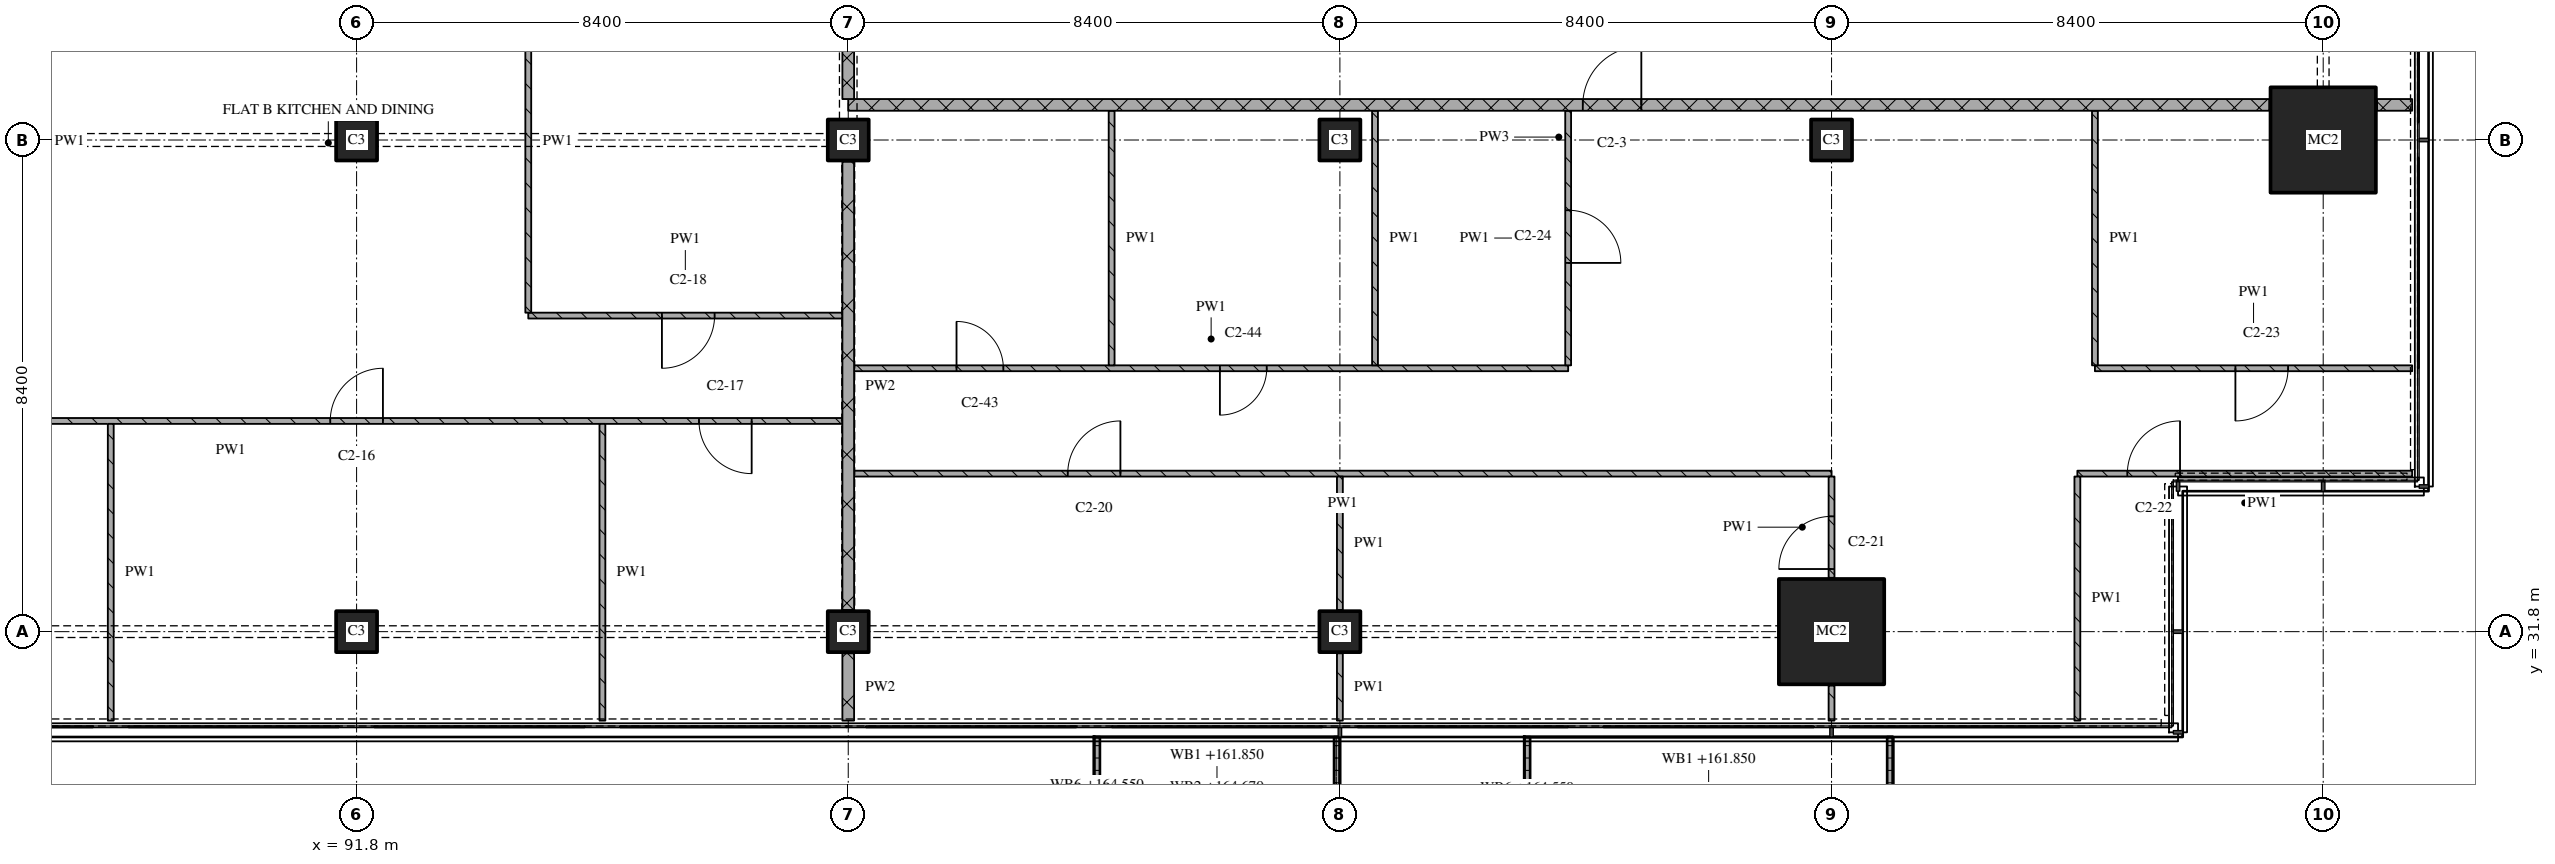
"""IFC4 building model, lengths in metres.
Left out: names, types, materials, properties, quantities, classifications, styles, units other than length and angle.
Written with IfcOpenShell. Run it as: python <this file> out.ifc"""

import sys

from ifc_helpers import new_model, si_unit, direction, frame, frame_2d, origin, origin_2d, place, context, subcontext, project, spatial, polyline, rectangle, outline, extrude, element, fill, save


model = new_model("IFC4")
c1 = context("Model", 3, precision=1e-05, world=origin(), true_north=direction((0.0, 1.0)))
c2 = subcontext(c1, "Body", "Model", "MODEL_VIEW")
j1 = project(units=[si_unit("LENGTHUNIT", "METRE"), si_unit("PLANEANGLEUNIT", "RADIAN")], contexts=[c1])
p1 = place(None, origin())
s1 = spatial("IfcSite", under=j1, at=p1, CompositionType="ELEMENT")
p2 = place(p1, origin())
s2 = spatial("IfcBuilding", under=s1, at=p2, CompositionType="ELEMENT")
p3 = place(p2, frame((0.0, 0.0, 161.85)))
s3 = spatial("IfcBuildingStorey", under=s2, at=p3, CompositionType="ELEMENT", Elevation=161.85)
for number, where, z_axis, x_axis in (
    (1, (91.8, 31.8, 0.0), (0.0, 0.0, 1.0), (1.0, 0.0, 0.0)),
    (2, (91.8, 40.2, 0.0), (0.0, 0.0, 1.0), (1.0, 0.0, 0.0)),
    (3, (100.2, 31.8, 0.0), (0.0, 0.0, 1.0), (1.0, 0.0, 0.0)),
    (4, (100.2, 40.2, 0.0), (0.0, 0.0, 1.0), (1.0, 0.0, 0.0)),
    (5, (108.6, 31.8, 0.0), (0.0, 0.0, 1.0), (1.0, 0.0, 0.0)),
    (6, (108.6, 40.2, 0.0), (0.0, 0.0, 1.0), (1.0, 0.0, 0.0)),
):
    element("IfcColumn", number, at=place(p3, frame(where, z_axis=z_axis, x_axis=x_axis)), inside=s3, PredefinedType="COLUMN", context=c2, shape_type="SweptSolid", body=[
        extrude(rectangle(XDim=0.7, YDim=0.7, at=origin_2d()), origin(), (0.0, 0.0, 1.0), 3.6),
    ])
p4 = place(p3, frame((117.0, 31.8, 0.0), z_axis=(0.0, 0.0, 1.0), x_axis=(1.0, 0.0, 0.0)))
e7 = element("IfcColumn", 7, at=p4, inside=s3, PredefinedType="COLUMN", context=c2, shape_type="SweptSolid", body=[
    extrude(rectangle(XDim=1.8, YDim=1.8, at=origin_2d()), origin(), (0.0, 0.0, 1.0), 3.6),
])
p5 = place(p3, frame((117.0, 40.2, 0.0), z_axis=(0.0, 0.0, 1.0), x_axis=(1.0, 0.0, 0.0)))
e8 = element("IfcColumn", 8, at=p5, inside=s3, PredefinedType="COLUMN", context=c2, shape_type="SweptSolid", body=[
    extrude(rectangle(XDim=0.7, YDim=0.7, at=origin_2d()), origin(), (0.0, 0.0, 1.0), 3.6),
])
p6 = place(p3, frame((125.4, 40.2, 0.0), z_axis=(0.0, 0.0, 1.0), x_axis=(1.0, 0.0, 0.0)))
e9 = element("IfcColumn", 9, at=p6, inside=s3, PredefinedType="COLUMN", context=c2, shape_type="SweptSolid", body=[
    extrude(rectangle(XDim=1.8, YDim=1.8, at=origin_2d()), origin(), (0.0, 0.0, 1.0), 3.6),
])
p7 = place(p3, origin())
e10 = element("IfcWall", 10, at=p7, inside=s3, PredefinedType="SOLIDWALL", context=c2, shape_type="SweptSolid", body=[
    extrude(outline(polyline([(104.4, 30.0), (104.5, 30.0), (104.5, 28.367), (108.5, 28.367), (108.5, 30.0), (108.6, 30.0), (108.6, 28.267), (104.4, 28.267), (104.4, 30.0)])), origin(), (0.0, 0.0, 1.0), 1.0),
])
p8 = place(p3, origin())
e11 = element("IfcWall", 11, at=p8, inside=s3, PredefinedType="SOLIDWALL", context=c2, shape_type="SweptSolid", body=[
    extrude(outline(polyline([(111.75, 30.0), (111.85, 30.0), (111.85, 28.233), (117.95, 28.233), (117.95, 30.0), (118.05, 30.0), (118.05, 28.133), (111.75, 28.133), (111.75, 30.0)])), origin(), (0.0, 0.0, 1.0), 1.0),
])
p9 = place(p3, frame((117.0, 34.5, 0.0), z_axis=(0.0, 0.0, 1.0), x_axis=(-1.0, 0.0, 0.0)))
e12 = element("IfcWall", 12, at=p9, inside=s3, PredefinedType="PARTITIONING", context=c2, shape_type="SweptSolid", body=[
    extrude(rectangle(XDim=16.7, YDim=0.1, at=frame_2d((8.35, 0.0))), origin(), (0.0, 0.0, 1.0), 3.32),
])
p10 = place(p9, frame((12.15, 0.0, 0.0)))
e13 = element("IfcOpeningElement", 13, at=p10, cuts=e12, PredefinedType="OPENING", context=c2, shape_type="SweptSolid", body=[
    extrude(rectangle(XDim=0.9, YDim=2.1, at=frame_2d((0.45, 1.05))), frame((0.0, 0.06, 0.0), z_axis=(0.0, -1.0, 0.0), x_axis=(1.0, 0.0, 0.0)), (0.0, 0.0, 1.0), 0.12),
])
p11 = place(p3, frame((126.92, 34.5, 0.0), z_axis=(0.0, 0.0, 1.0), x_axis=(-1.0, 0.0, 0.0)))
e14 = element("IfcWall", 14, at=p11, inside=s3, PredefinedType="PARTITIONING", context=c2, shape_type="SweptSolid", body=[
    extrude(rectangle(XDim=5.72, YDim=0.1, at=frame_2d((2.86, 0.0))), origin(), (0.0, 0.0, 1.0), 3.32),
])
p12 = place(p11, frame((3.966, 0.0, 0.0)))
e15 = element("IfcOpeningElement", 15, at=p12, cuts=e14, PredefinedType="OPENING", context=c2, shape_type="SweptSolid", body=[
    extrude(rectangle(XDim=0.9, YDim=2.1, at=frame_2d((0.45, 1.05))), frame((0.0, 0.06, 0.0), z_axis=(0.0, -1.0, 0.0), x_axis=(1.0, 0.0, 0.0)), (0.0, 0.0, 1.0), 0.12),
])
p13 = place(p3, frame((100.1, 35.4, 0.0), z_axis=(0.0, 0.0, 1.0), x_axis=(-1.0, 0.0, 0.0)))
e16 = element("IfcWall", 16, at=p13, inside=s3, PredefinedType="PARTITIONING", context=c2, shape_type="SweptSolid", body=[
    extrude(rectangle(XDim=20.9, YDim=0.1, at=frame_2d((10.45, 0.0))), origin(), (0.0, 0.0, 1.0), 3.32),
])
p14 = place(p13, frame((1.55, 0.0, 0.0)))
e17 = element("IfcOpeningElement", 17, at=p14, cuts=e16, PredefinedType="OPENING", context=c2, shape_type="SweptSolid", body=[
    extrude(rectangle(XDim=0.9, YDim=2.1, at=frame_2d((0.45, 1.05))), frame((0.0, 0.06, 0.0), z_axis=(0.0, -1.0, 0.0), x_axis=(1.0, 0.0, 0.0)), (0.0, 0.0, 1.0), 0.12),
])
p15 = place(p13, frame((7.85, 0.0, 0.0)))
e18 = element("IfcOpeningElement", 18, at=p15, cuts=e16, PredefinedType="OPENING", context=c2, shape_type="SweptSolid", body=[
    extrude(rectangle(XDim=0.9, YDim=2.1, at=frame_2d((0.45, 1.05))), frame((0.0, 0.06, 0.0), z_axis=(0.0, -1.0, 0.0), x_axis=(1.0, 0.0, 0.0)), (0.0, 0.0, 1.0), 0.12),
])
p16 = place(p13, frame((16.25, 0.0, 0.0)))
e19 = element("IfcOpeningElement", 19, at=p16, cuts=e16, PredefinedType="OPENING", context=c2, shape_type="SweptSolid", body=[
    extrude(rectangle(XDim=0.9, YDim=2.1, at=frame_2d((0.45, 1.05))), frame((0.0, 0.06, 0.0), z_axis=(0.0, -1.0, 0.0), x_axis=(1.0, 0.0, 0.0)), (0.0, 0.0, 1.0), 0.12),
])
p17 = place(p3, frame((100.3, 36.3, 0.0), z_axis=(0.0, 0.0, 1.0), x_axis=(1.0, 0.0, 0.0)))
e20 = element("IfcWall", 20, at=p17, inside=s3, PredefinedType="PARTITIONING", context=c2, shape_type="SweptSolid", body=[
    extrude(rectangle(XDim=12.2, YDim=0.1, at=frame_2d((6.1, 0.0))), origin(), (0.0, 0.0, 1.0), 3.32),
])
p18 = place(p17, frame((1.75, 0.0, 0.0)))
e21 = element("IfcOpeningElement", 21, at=p18, cuts=e20, PredefinedType="OPENING", context=c2, shape_type="SweptSolid", body=[
    extrude(rectangle(XDim=0.8, YDim=2.1, at=frame_2d((0.4, 1.05))), frame((0.0, 0.06, 0.0), z_axis=(0.0, -1.0, 0.0), x_axis=(1.0, 0.0, 0.0)), (0.0, 0.0, 1.0), 0.12),
])
p19 = place(p17, frame((6.25, 0.0, 0.0)))
e22 = element("IfcOpeningElement", 22, at=p19, cuts=e20, PredefinedType="OPENING", context=c2, shape_type="SweptSolid", body=[
    extrude(rectangle(XDim=0.8, YDim=2.1, at=frame_2d((0.4, 1.05))), frame((0.0, 0.06, 0.0), z_axis=(0.0, -1.0, 0.0), x_axis=(1.0, 0.0, 0.0)), (0.0, 0.0, 1.0), 0.12),
])
p20 = place(p3, frame((121.5, 36.3, 0.0), z_axis=(0.0, 0.0, 1.0), x_axis=(1.0, 0.0, 0.0)))
e23 = element("IfcWall", 23, at=p20, inside=s3, PredefinedType="PARTITIONING", context=c2, shape_type="SweptSolid", body=[
    extrude(rectangle(XDim=5.42, YDim=0.1, at=frame_2d((2.71, 0.0))), origin(), (0.0, 0.0, 1.0), 3.32),
])
p21 = place(p20, frame((2.4, 0.0, 0.0)))
e24 = element("IfcOpeningElement", 24, at=p21, cuts=e23, PredefinedType="OPENING", context=c2, shape_type="SweptSolid", body=[
    extrude(rectangle(XDim=0.9, YDim=2.1, at=frame_2d((0.45, 1.05))), frame((0.0, 0.06, 0.0), z_axis=(0.0, -1.0, 0.0), x_axis=(1.0, 0.0, 0.0)), (0.0, 0.0, 1.0), 0.12),
])
p22 = place(p3, frame((94.733, 37.2, 0.0), z_axis=(0.0, 0.0, 1.0), x_axis=(1.0, 0.0, 0.0)))
e25 = element("IfcWall", 25, at=p22, inside=s3, PredefinedType="PARTITIONING", context=c2, shape_type="SweptSolid", body=[
    extrude(rectangle(XDim=5.367, YDim=0.1, at=frame_2d((2.683, 0.0))), origin(), (0.0, 0.0, 1.0), 3.32),
])
p23 = place(p22, frame((2.283, 0.0, 0.0)))
e26 = element("IfcOpeningElement", 26, at=p23, cuts=e25, PredefinedType="OPENING", context=c2, shape_type="SweptSolid", body=[
    extrude(rectangle(XDim=0.9, YDim=2.1, at=frame_2d((0.45, 1.05))), frame((0.0, 0.06, 0.0), z_axis=(0.0, -1.0, 0.0), x_axis=(1.0, 0.0, 0.0)), (0.0, 0.0, 1.0), 0.12),
])
p24 = place(p3, frame((124.48, 40.8, 0.0), z_axis=(0.0, 0.0, 1.0), x_axis=(-1.0, 0.0, 0.0)))
e27 = element("IfcWall", 27, at=p24, inside=s3, PredefinedType="PARTITIONING", context=c2, shape_type="SweptSolid", body=[
    extrude(rectangle(XDim=24.28, YDim=0.2, at=frame_2d((12.14, 0.0))), origin(), (0.0, 0.0, 1.0), 3.32),
])
p25 = place(p24, frame((10.73, 0.0, 0.0)))
e28 = element("IfcOpeningElement", 28, at=p25, cuts=e27, PredefinedType="OPENING", context=c2, shape_type="SweptSolid", body=[
    extrude(rectangle(XDim=1.0, YDim=2.1, at=frame_2d((0.5, 1.05))), frame((0.0, 0.11, 0.0), z_axis=(0.0, -1.0, 0.0), x_axis=(1.0, 0.0, 0.0)), (0.0, 0.0, 1.0), 0.22),
])
p26 = place(p3, frame((126.32, 40.8, 0.0), z_axis=(0.0, 0.0, 1.0), x_axis=(1.0, 0.0, 0.0)))
e29 = element("IfcWall", 29, at=p26, inside=s3, PredefinedType="PARTITIONING", context=c2, shape_type="SweptSolid", body=[
    extrude(rectangle(XDim=0.6, YDim=0.2, at=frame_2d((0.3, 0.0))), origin(), (0.0, 0.0, 1.0), 3.32),
])
p27 = place(p3, frame((87.6, 35.35, 0.0), z_axis=(0.0, 0.0, 1.0), x_axis=(0.0, -1.0, 0.0)))
e30 = element("IfcWall", 30, at=p27, inside=s3, PredefinedType="PARTITIONING", context=c2, shape_type="SweptSolid", body=[
    extrude(rectangle(XDim=5.07, YDim=0.1, at=frame_2d((2.535, 0.0))), origin(), (0.0, 0.0, 1.0), 3.32),
])
p28 = place(p3, frame((94.733, 43.1, 0.0), z_axis=(0.0, 0.0, 1.0), x_axis=(0.0, -1.0, 0.0)))
e31 = element("IfcWall", 31, at=p28, inside=s3, PredefinedType="PARTITIONING", context=c2, shape_type="SweptSolid", body=[
    extrude(rectangle(XDim=5.85, YDim=0.1, at=frame_2d((2.925, 0.0))), origin(), (0.0, 0.0, 1.0), 3.32),
])
p29 = place(p3, frame((96.0, 35.35, 0.0), z_axis=(0.0, 0.0, 1.0), x_axis=(0.0, -1.0, 0.0)))
e32 = element("IfcWall", 32, at=p29, inside=s3, PredefinedType="PARTITIONING", context=c2, shape_type="SweptSolid", body=[
    extrude(rectangle(XDim=5.07, YDim=0.1, at=frame_2d((2.535, 0.0))), origin(), (0.0, 0.0, 1.0), 3.32),
])
p30 = place(p3, frame((100.2, 43.1, 0.0), z_axis=(0.0, 0.0, 1.0), x_axis=(0.0, -1.0, 0.0)))
e33 = element("IfcWall", 33, at=p30, inside=s3, PredefinedType="PARTITIONING", context=c2, shape_type="SweptSolid", body=[
    extrude(rectangle(XDim=2.2, YDim=0.2, at=frame_2d((1.1, 0.0))), origin(), (0.0, 0.0, 1.0), 2.43),
])
p31 = place(p3, frame((100.2, 31.43, 0.0), z_axis=(0.0, 0.0, 1.0), x_axis=(0.0, -1.0, 0.0)))
e34 = element("IfcWall", 34, at=p31, inside=s3, PredefinedType="PARTITIONING", context=c2, shape_type="SweptSolid", body=[
    extrude(rectangle(XDim=1.15, YDim=0.2, at=frame_2d((0.575, 0.0))), origin(), (0.0, 0.0, 1.0), 3.32),
])
p32 = place(p3, frame((100.2, 39.83, 0.0), z_axis=(0.0, 0.0, 1.0), x_axis=(0.0, -1.0, 0.0)))
e35 = element("IfcWall", 35, at=p32, inside=s3, PredefinedType="PARTITIONING", context=c2, shape_type="SweptSolid", body=[
    extrude(rectangle(XDim=7.66, YDim=0.2, at=frame_2d((3.83, 0.0))), origin(), (0.0, 0.0, 1.0), 2.72),
])
p33 = place(p3, frame((104.7, 40.7, 0.0), z_axis=(0.0, 0.0, 1.0), x_axis=(0.0, -1.0, 0.0)))
e36 = element("IfcWall", 36, at=p33, inside=s3, PredefinedType="PARTITIONING", context=c2, shape_type="SweptSolid", body=[
    extrude(rectangle(XDim=4.35, YDim=0.1, at=frame_2d((2.175, 0.0))), origin(), (0.0, 0.0, 1.0), 3.32),
])
p34 = place(p3, frame((108.6, 31.43, 0.0), z_axis=(0.0, 0.0, 1.0), x_axis=(0.0, -1.0, 0.0)))
e37 = element("IfcWall", 37, at=p34, inside=s3, PredefinedType="PARTITIONING", context=c2, shape_type="SweptSolid", body=[
    extrude(rectangle(XDim=1.15, YDim=0.1, at=frame_2d((0.575, 0.0))), origin(), (0.0, 0.0, 1.0), 3.32),
])
p35 = place(p3, frame((108.6, 34.45, 0.0), z_axis=(0.0, 0.0, 1.0), x_axis=(0.0, -1.0, 0.0)))
e38 = element("IfcWall", 38, at=p35, inside=s3, PredefinedType="PARTITIONING", context=c2, shape_type="SweptSolid", body=[
    extrude(rectangle(XDim=2.28, YDim=0.1, at=frame_2d((1.14, 0.0))), origin(), (0.0, 0.0, 1.0), 3.32),
])
p36 = place(p3, frame((109.2, 40.7, 0.0), z_axis=(0.0, 0.0, 1.0), x_axis=(0.0, -1.0, 0.0)))
e39 = element("IfcWall", 39, at=p36, inside=s3, PredefinedType="PARTITIONING", context=c2, shape_type="SweptSolid", body=[
    extrude(rectangle(XDim=4.35, YDim=0.1, at=frame_2d((2.175, 0.0))), origin(), (0.0, 0.0, 1.0), 3.32),
])
p37 = place(p3, frame((112.5, 36.35, 0.0), z_axis=(0.0, 0.0, 1.0), x_axis=(0.0, 1.0, 0.0)))
e40 = element("IfcWall", 40, at=p37, inside=s3, PredefinedType="PARTITIONING", context=c2, shape_type="SweptSolid", body=[
    extrude(rectangle(XDim=4.35, YDim=0.1, at=frame_2d((2.175, 0.0))), origin(), (0.0, 0.0, 1.0), 3.32),
])
p38 = place(p37, frame((1.75, 0.0, 0.0)))
e41 = element("IfcOpeningElement", 41, at=p38, cuts=e40, PredefinedType="OPENING", context=c2, shape_type="SweptSolid", body=[
    extrude(rectangle(XDim=0.9, YDim=2.1, at=frame_2d((0.45, 1.05))), frame((0.0, 0.06, 0.0), z_axis=(0.0, -1.0, 0.0), x_axis=(1.0, 0.0, 0.0)), (0.0, 0.0, 1.0), 0.12),
])
p39 = place(p3, frame((117.0, 30.88, 0.0), z_axis=(0.0, 0.0, 1.0), x_axis=(0.0, -1.0, 0.0)))
e42 = element("IfcWall", 42, at=p39, inside=s3, PredefinedType="PARTITIONING", context=c2, shape_type="SweptSolid", body=[
    extrude(rectangle(XDim=0.6, YDim=0.1, at=frame_2d((0.3, 0.0))), origin(), (0.0, 0.0, 1.0), 3.32),
])
p40 = place(p3, frame((117.0, 32.72, 0.0), z_axis=(0.0, 0.0, 1.0), x_axis=(0.0, 1.0, 0.0)))
e43 = element("IfcWall", 43, at=p40, inside=s3, PredefinedType="PARTITIONING", context=c2, shape_type="SweptSolid", body=[
    extrude(rectangle(XDim=1.73, YDim=0.1, at=frame_2d((0.865, 0.0))), origin(), (0.0, 0.0, 1.0), 3.32),
])
p41 = place(p40, frame((0.15, 0.0, 0.0)))
e44 = element("IfcOpeningElement", 44, at=p41, cuts=e43, PredefinedType="OPENING", context=c2, shape_type="SweptSolid", body=[
    extrude(rectangle(XDim=0.9, YDim=2.1, at=frame_2d((0.45, 1.05))), frame((0.0, 0.06, 0.0), z_axis=(0.0, -1.0, 0.0), x_axis=(1.0, 0.0, 0.0)), (0.0, 0.0, 1.0), 0.12),
])
p42 = place(p3, frame((121.2, 34.45, 0.0), z_axis=(0.0, 0.0, 1.0), x_axis=(0.0, -1.0, 0.0)))
e45 = element("IfcWall", 45, at=p42, inside=s3, PredefinedType="PARTITIONING", context=c2, shape_type="SweptSolid", body=[
    extrude(rectangle(XDim=4.17, YDim=0.1, at=frame_2d((2.085, 0.0))), origin(), (0.0, 0.0, 1.0), 3.32),
])
p43 = place(p3, frame((121.5, 40.7, 0.0), z_axis=(0.0, 0.0, 1.0), x_axis=(0.0, -1.0, 0.0)))
e46 = element("IfcWall", 46, at=p43, inside=s3, PredefinedType="PARTITIONING", context=c2, shape_type="SweptSolid", body=[
    extrude(rectangle(XDim=4.35, YDim=0.1, at=frame_2d((2.175, 0.0))), origin(), (0.0, 0.0, 1.0), 3.32),
])
p44 = place(p10, origin())
e47 = element("IfcDoor", 47, at=p44, inside=s3, OperationType="SINGLE_SWING_RIGHT", PredefinedType="DOOR", context=c2, shape_type="SweptSolid", body=[
    extrude(rectangle(XDim=0.9, YDim=2.1, at=frame_2d((0.45, 1.05))), frame((0.0, 0.025, 0.0), z_axis=(0.0, -1.0, 0.0), x_axis=(1.0, 0.0, 0.0)), (0.0, 0.0, 1.0), 0.05),
])
fill(e13, e47)
p45 = place(p12, origin())
e48 = element("IfcDoor", 48, at=p45, inside=s3, OperationType="SINGLE_SWING_RIGHT", PredefinedType="DOOR", context=c2, shape_type="SweptSolid", body=[
    extrude(rectangle(XDim=0.9, YDim=2.1, at=frame_2d((0.45, 1.05))), frame((0.0, 0.025, 0.0), z_axis=(0.0, -1.0, 0.0), x_axis=(1.0, 0.0, 0.0)), (0.0, 0.0, 1.0), 0.05),
])
fill(e15, e48)
p46 = place(p14, origin())
e49 = element("IfcDoor", 49, at=p46, inside=s3, OperationType="SINGLE_SWING_LEFT", PredefinedType="DOOR", context=c2, shape_type="SweptSolid", body=[
    extrude(rectangle(XDim=0.9, YDim=2.1, at=frame_2d((0.45, 1.05))), frame((0.0, 0.025, 0.0), z_axis=(0.0, -1.0, 0.0), x_axis=(1.0, 0.0, 0.0)), (0.0, 0.0, 1.0), 0.05),
])
fill(e17, e49)
p47 = place(p15, origin())
e50 = element("IfcDoor", 50, at=p47, inside=s3, OperationType="SINGLE_SWING_RIGHT", PredefinedType="DOOR", context=c2, shape_type="SweptSolid", body=[
    extrude(rectangle(XDim=0.9, YDim=2.1, at=frame_2d((0.45, 1.05))), frame((0.0, 0.025, 0.0), z_axis=(0.0, -1.0, 0.0), x_axis=(1.0, 0.0, 0.0)), (0.0, 0.0, 1.0), 0.05),
])
fill(e18, e50)
p48 = place(p18, origin())
e51 = element("IfcDoor", 51, at=p48, inside=s3, OperationType="SINGLE_SWING_LEFT", PredefinedType="DOOR", context=c2, shape_type="SweptSolid", body=[
    extrude(rectangle(XDim=0.8, YDim=2.1, at=frame_2d((0.4, 1.05))), frame((0.0, 0.025, 0.0), z_axis=(0.0, -1.0, 0.0), x_axis=(1.0, 0.0, 0.0)), (0.0, 0.0, 1.0), 0.05),
])
fill(e21, e51)
p49 = place(p19, origin())
e52 = element("IfcDoor", 52, at=p49, inside=s3, OperationType="SINGLE_SWING_RIGHT", PredefinedType="DOOR", context=c2, shape_type="SweptSolid", body=[
    extrude(rectangle(XDim=0.8, YDim=2.1, at=frame_2d((0.4, 1.05))), frame((0.0, 0.025, 0.0), z_axis=(0.0, -1.0, 0.0), x_axis=(1.0, 0.0, 0.0)), (0.0, 0.0, 1.0), 0.05),
])
fill(e22, e52)
p50 = place(p21, origin())
e53 = element("IfcDoor", 53, at=p50, inside=s3, OperationType="SINGLE_SWING_RIGHT", PredefinedType="DOOR", context=c2, shape_type="SweptSolid", body=[
    extrude(rectangle(XDim=0.9, YDim=2.1, at=frame_2d((0.45, 1.05))), frame((0.0, 0.025, 0.0), z_axis=(0.0, -1.0, 0.0), x_axis=(1.0, 0.0, 0.0)), (0.0, 0.0, 1.0), 0.05),
])
fill(e24, e53)
p51 = place(p23, origin())
e54 = element("IfcDoor", 54, at=p51, inside=s3, OperationType="SINGLE_SWING_RIGHT", PredefinedType="DOOR", context=c2, shape_type="SweptSolid", body=[
    extrude(rectangle(XDim=0.9, YDim=2.1, at=frame_2d((0.45, 1.05))), frame((0.0, 0.025, 0.0), z_axis=(0.0, -1.0, 0.0), x_axis=(1.0, 0.0, 0.0)), (0.0, 0.0, 1.0), 0.05),
])
fill(e26, e54)
p52 = place(p25, origin())
e55 = element("IfcDoor", 55, at=p52, inside=s3, OperationType="SINGLE_SWING_RIGHT", PredefinedType="DOOR", context=c2, shape_type="SweptSolid", body=[
    extrude(rectangle(XDim=1.0, YDim=2.1, at=frame_2d((0.5, 1.05))), frame((0.0, 0.025, 0.0), z_axis=(0.0, -1.0, 0.0), x_axis=(1.0, 0.0, 0.0)), (0.0, 0.0, 1.0), 0.05),
])
fill(e28, e55)
p53 = place(p38, origin())
e56 = element("IfcDoor", 56, at=p53, inside=s3, OperationType="SINGLE_SWING_RIGHT", PredefinedType="DOOR", context=c2, shape_type="SweptSolid", body=[
    extrude(rectangle(XDim=0.9, YDim=2.1, at=frame_2d((0.45, 1.05))), frame((0.0, 0.025, 0.0), z_axis=(0.0, -1.0, 0.0), x_axis=(1.0, 0.0, 0.0)), (0.0, 0.0, 1.0), 0.05),
])
fill(e41, e56)
p54 = place(p41, origin())
e57 = element("IfcDoor", 57, at=p54, inside=s3, OperationType="SINGLE_SWING_LEFT", PredefinedType="DOOR", context=c2, shape_type="SweptSolid", body=[
    extrude(rectangle(XDim=0.9, YDim=2.1, at=frame_2d((0.45, 1.05))), frame((0.0, 0.025, 0.0), z_axis=(0.0, -1.0, 0.0), x_axis=(1.0, 0.0, 0.0)), (0.0, 0.0, 1.0), 0.05),
])
fill(e44, e57)
save(model, sys.argv[1])
